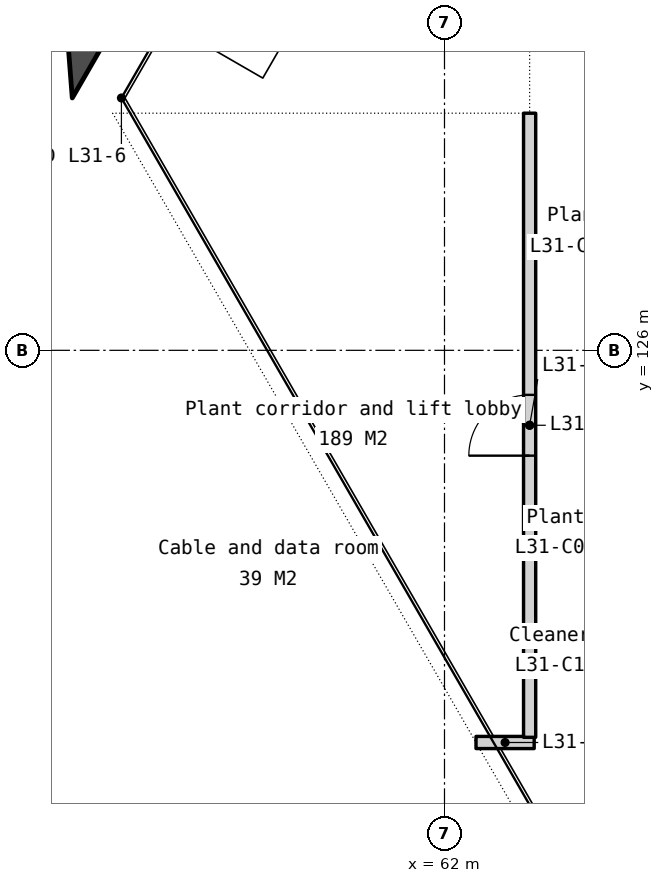
"""IFC4 building model, lengths in metres.
Left out: names, types, materials, properties, quantities, classifications, styles, units other than length and angle.
Written with IfcOpenShell. Run it as: python <this file> out.ifc"""

import sys

from ifc_helpers import new_model, si_unit, direction, frame, frame_2d, origin, place, context, subcontext, project, spatial, polyline, rectangle, outline, extrude, element, fill, save


model = new_model("IFC4")
c1 = context("Model", 3, precision=1e-05, world=origin(), true_north=direction((0.0, 1.0)))
c2 = subcontext(c1, "Body", "Model", "MODEL_VIEW")
j1 = project(units=[si_unit("LENGTHUNIT", "METRE"), si_unit("PLANEANGLEUNIT", "RADIAN")], contexts=[c1])
p1 = place(None, origin())
s1 = spatial("IfcSite", under=j1, at=p1, CompositionType="ELEMENT")
p2 = place(p1, origin())
s2 = spatial("IfcBuilding", under=s1, at=p2, CompositionType="ELEMENT")
p3 = place(p2, frame((0.0, 0.0, 123.8)))
s3 = spatial("IfcBuildingStorey", under=s2, at=p3, CompositionType="ELEMENT", Elevation=123.8)
p4 = place(p3, frame((0.0, 0.0, -0.25)))
e1 = element("IfcWall", 1, at=p4, inside=s3, PredefinedType="SOLIDWALL", context=c2, shape_type="SweptSolid", body=[
    extrude(outline(polyline([(58.678, 135.0), (55.573, 134.108), (55.878, 130.15), (58.678, 135.0)])), origin(), (0.0, 0.0, 1.0), 4.6),
])
p5 = place(p3, frame((62.518, 119.55, 0.0), z_axis=(0.0, 0.0, 1.0), x_axis=(1.0, 0.0, 0.0)))
e2 = element("IfcWall", 2, at=p5, inside=s3, PredefinedType="PARTITIONING", context=c2, shape_type="SweptSolid", body=[
    extrude(rectangle(XDim=0.957, YDim=0.2, at=frame_2d((0.479, 0.0))), origin(), (0.0, 0.0, 1.0), 4.35),
])
p6 = place(p3, frame((63.4, 119.635, 0.0), z_axis=(0.0, 0.0, 1.0), x_axis=(0.0, 1.0, 0.0)))
e3 = element("IfcWall", 3, at=p6, inside=s3, PredefinedType="PARTITIONING", context=c2, shape_type="SweptSolid", body=[
    extrude(rectangle(XDim=10.265, YDim=0.2, at=frame_2d((5.132, 0.0))), origin(), (0.0, 0.0, 1.0), 4.35),
])
p7 = place(p6, frame((4.633, 0.0, 0.0)))
e4 = element("IfcOpeningElement", 4, at=p7, cuts=e3, PredefinedType="OPENING", context=c2, shape_type="SweptSolid", body=[
    extrude(rectangle(XDim=1.0, YDim=2.1, at=frame_2d((0.5, 1.05))), frame((0.0, 0.11, 0.0), z_axis=(0.0, -1.0, 0.0), x_axis=(1.0, 0.0, 0.0)), (0.0, 0.0, 1.0), 0.22),
])
p8 = place(p7, origin())
e5 = element("IfcDoor", 5, at=p8, inside=s3, OperationType="SINGLE_SWING_LEFT", PredefinedType="DOOR", context=c2, shape_type="SweptSolid", body=[
    extrude(rectangle(XDim=1.0, YDim=2.1, at=frame_2d((0.5, 1.05))), frame((0.0, 0.025, 0.0), z_axis=(0.0, -1.0, 0.0), x_axis=(1.0, 0.0, 0.0)), (0.0, 0.0, 1.0), 0.05),
])
fill(e4, e5)
save(model, sys.argv[1])
